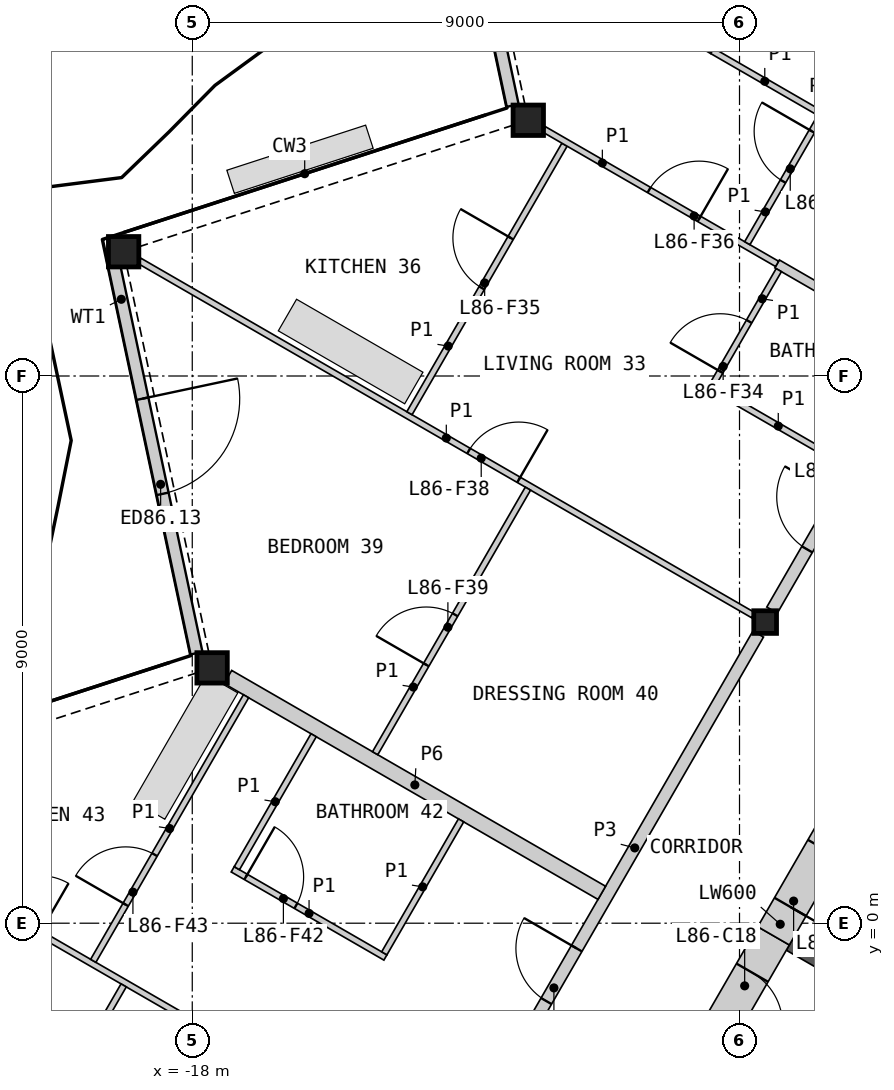
"""IFC4 building model, lengths in metres.
Left out: names, types, materials, properties, quantities, classifications, styles, units other than length and angle.
Written with IfcOpenShell. Run it as: python <this file> out.ifc"""

import sys

from ifc_helpers import new_model, si_unit, direction, frame, frame_2d, origin, origin_2d, place, context, subcontext, project, spatial, polyline, rectangle, hollow_rectangle, i_section, outline, extrude, element, fill, save


model = new_model("IFC4")
c1 = context("Model", 3, precision=1e-05, world=origin(), true_north=direction((0.0, 1.0)))
c2 = subcontext(c1, "Body", "Model", "MODEL_VIEW")
j1 = project(units=[si_unit("LENGTHUNIT", "METRE"), si_unit("PLANEANGLEUNIT", "RADIAN")], contexts=[c1])
p1 = place(None, origin())
s1 = spatial("IfcSite", under=j1, at=p1, CompositionType="ELEMENT")
p2 = place(p1, origin())
s2 = spatial("IfcBuilding", under=s1, at=p2, CompositionType="ELEMENT")
p3 = place(p2, frame((0.0, 0.0, 381.4)))
s3 = spatial("IfcBuildingStorey", under=s2, at=p3, CompositionType="ELEMENT", Elevation=381.4)
for number, where, z_axis, x_axis in (
    (1, (-12.474, 13.206, 0.0), (0.0, 0.0, 1.0), (1.0, 0.0, 0.0)),
    (2, (-19.129, 11.044, 0.0), (0.0, 0.0, 1.0), (1.0, 0.0, 0.0)),
    (3, (-17.674, 4.199, 0.0), (0.0, 0.0, 1.0), (1.0, 0.0, 0.0)),
):
    element("IfcColumn", number, at=place(p3, frame(where, z_axis=z_axis, x_axis=x_axis)), inside=s3, PredefinedType="COLUMN", context=c2, shape_type="SweptSolid", body=[
        extrude(hollow_rectangle(XDim=0.5, YDim=0.5, WallThickness=0.03, at=origin_2d()), origin(), (0.0, 0.0, 1.0), 3.4),
    ])
p4 = place(p3, frame((-8.578, 4.953, 0.0), z_axis=(0.0, 0.0, 1.0), x_axis=(1.0, 0.0, 0.0)))
e4 = element("IfcColumn", 4, at=p4, inside=s3, PredefinedType="COLUMN", context=c2, shape_type="SweptSolid", body=[
    extrude(i_section(OverallWidth=0.374, OverallDepth=0.372, WebThickness=0.016, FlangeThickness=0.026, at=origin_2d()), origin(), (0.0, 0.0, 1.0), 3.4),
])
p5 = place(p3, frame((-14.104, 19.915, 0.0), z_axis=(0.0, 0.0, 1.0), x_axis=(0.207924998532, -0.978144771997, 0.0)))
e5 = element("IfcWall", 5, at=p5, inside=s3, PredefinedType="SOLIDWALL", context=c2, shape_type="SweptSolid", body=[
    extrude(rectangle(XDim=6.612, YDim=0.2, at=frame_2d((3.306, 0.0))), origin(), (0.0, 0.0, 1.0), 2.634),
])
p6 = place(p5, frame((2.333, 0.0, 0.0)))
e6 = element("IfcOpeningElement", 6, at=p6, cuts=e5, PredefinedType="OPENING", context=c2, shape_type="SweptSolid", body=[
    extrude(rectangle(XDim=1.6, YDim=2.25, at=frame_2d((0.8, 1.125))), frame((0.0, 0.11, 0.0), z_axis=(0.0, -1.0, 0.0), x_axis=(1.0, 0.0, 0.0)), (0.0, 0.0, 1.0), 0.22),
])
p7 = place(p3, frame((-19.304, 10.909, 0.0), z_axis=(0.0, 0.0, 1.0), x_axis=(0.207882161022, -0.97815387702, 0.0)))
e7 = element("IfcWall", 7, at=p7, inside=s3, PredefinedType="SOLIDWALL", context=c2, shape_type="SweptSolid", body=[
    extrude(rectangle(XDim=6.612, YDim=0.2, at=frame_2d((3.306, 0.0))), origin(), (0.0, 0.0, 1.0), 2.634),
])
p8 = place(p7, frame((2.333, 0.0, 0.0)))
e8 = element("IfcOpeningElement", 8, at=p8, cuts=e7, PredefinedType="OPENING", context=c2, shape_type="SweptSolid", body=[
    extrude(rectangle(XDim=1.6, YDim=2.25, at=frame_2d((0.8, 1.125))), frame((0.0, 0.11, 0.0), z_axis=(0.0, -1.0, 0.0), x_axis=(1.0, 0.0, 0.0)), (0.0, 0.0, 1.0), 0.22),
])
p9 = place(p3, origin())
e9 = element("IfcWall", 9, at=p9, inside=s3, PredefinedType="SHEAR", context=c2, shape_type="SweptSolid", body=[
    extrude(outline(polyline([(-6.061, -1.697), (-8.231, -0.444), (-8.131, -0.271), (-5.96, -1.524), (-6.061, -1.697)])), origin(), (0.0, 0.0, 1.0), 3.1),
])
p10 = place(p3, origin())
e10 = element("IfcWall", 10, at=p10, inside=s3, PredefinedType="SHEAR", context=c2, shape_type="SweptSolid", body=[
    extrude(outline(polyline([(-5.307, -1.281), (-10.374, -4.206), (-10.032, -4.298), (-5.182, -1.498), (-5.307, -1.281)])), origin(), (0.0, 0.0, 1.0), 3.1),
])
p11 = place(p3, frame((-8.44, -0.208, 0.0), z_axis=(0.0, 0.0, 1.0), x_axis=(-0.500001951578, -0.866024277037, 0.0)))
e11 = element("IfcWall", 11, at=p11, inside=s3, PredefinedType="SHEAR", context=c2, shape_type="SweptSolid", body=[
    extrude(rectangle(XDim=2.243, YDim=0.6, at=frame_2d((1.122, 0.0))), origin(), (0.0, 0.0, 1.0), 3.1),
])
p12 = place(p11, frame((0.7, 0.0, 0.0)))
e12 = element("IfcOpeningElement", 12, at=p12, cuts=e11, PredefinedType="OPENING", context=c2, shape_type="SweptSolid", body=[
    extrude(rectangle(XDim=1.0, YDim=2.1, at=frame_2d((0.5, 1.05))), frame((0.0, 0.31, 0.0), z_axis=(0.0, -1.0, 0.0), x_axis=(1.0, 0.0, 0.0)), (0.0, 0.0, 1.0), 0.62),
])
p13 = place(p3, frame((-7.34, 1.698, 0.0), z_axis=(0.0, 0.0, 1.0), x_axis=(-0.50002983664, -0.866008176907, 0.0)))
e13 = element("IfcWall", 13, at=p13, inside=s3, PredefinedType="SHEAR", context=c2, shape_type="SweptSolid", body=[
    extrude(rectangle(XDim=2.2, YDim=0.6, at=frame_2d((1.1, 0.0))), origin(), (0.0, 0.0, 1.0), 3.1),
])
p14 = place(p13, frame((0.55, 0.0, 0.0)))
e14 = element("IfcOpeningElement", 14, at=p14, cuts=e13, PredefinedType="OPENING", context=c2, shape_type="SweptSolid", body=[
    extrude(rectangle(XDim=1.1, YDim=2.1, at=frame_2d((0.55, 1.05))), frame((0.0, 0.31, 0.0), z_axis=(0.0, -1.0, 0.0), x_axis=(1.0, 0.0, 0.0)), (0.0, 0.0, 1.0), 0.62),
])
p15 = place(p3, frame((-8.465, 5.15, 0.0), z_axis=(0.0, 0.0, 1.0), x_axis=(0.499992155518, 0.866029932751, 0.0)))
e15 = element("IfcWall", 15, at=p15, inside=s3, PredefinedType="PARTITIONING", context=c2, shape_type="SweptSolid", body=[
    extrude(rectangle(XDim=8.123, YDim=0.2, at=frame_2d((4.062, 0.0))), origin(), (0.0, 0.0, 1.0), 3.1),
])
p16 = place(p15, frame((1.153, 0.0, 0.0)))
e16 = element("IfcOpeningElement", 16, at=p16, cuts=e15, PredefinedType="OPENING", context=c2, shape_type="SweptSolid", body=[
    extrude(rectangle(XDim=1.0, YDim=2.1, at=frame_2d((0.5, 1.05))), frame((0.0, 0.11, 0.0), z_axis=(0.0, -1.0, 0.0), x_axis=(1.0, 0.0, 0.0)), (0.0, 0.0, 1.0), 0.22),
])
p17 = place(p3, frame((-12.754, -2.279, 0.0), z_axis=(0.0, 0.0, 1.0), x_axis=(0.500001682468, 0.866024432409, 0.0)))
e17 = element("IfcWall", 17, at=p17, inside=s3, PredefinedType="PARTITIONING", context=c2, shape_type="SweptSolid", body=[
    extrude(rectangle(XDim=8.124, YDim=0.2, at=frame_2d((4.062, 0.0))), origin(), (0.0, 0.0, 1.0), 3.1),
])
p18 = place(p17, frame((1.153, 0.0, 0.0)))
e18 = element("IfcOpeningElement", 18, at=p18, cuts=e17, PredefinedType="OPENING", context=c2, shape_type="SweptSolid", body=[
    extrude(rectangle(XDim=1.0, YDim=2.1, at=frame_2d((0.5, 1.05))), frame((0.0, 0.11, 0.0), z_axis=(0.0, -1.0, 0.0), x_axis=(1.0, 0.0, 0.0)), (0.0, 0.0, 1.0), 0.22),
])
p19 = place(p3, frame((-17.414, 4.049, 0.0), z_axis=(0.0, 0.0, 1.0), x_axis=(0.866033839264, -0.499985389037, 0.0)))
e19 = element("IfcWall", 19, at=p19, inside=s3, PredefinedType="PARTITIONING", context=c2, shape_type="SweptSolid", body=[
    extrude(rectangle(XDim=7.1, YDim=0.25, at=frame_2d((3.55, 0.0))), origin(), (0.0, 0.0, 1.0), 2.33),
])
p20 = place(p3, frame((-8.382, 10.844, 0.0), z_axis=(0.0, 0.0, 1.0), x_axis=(0.866021425885, -0.500006889861, 0.0)))
e20 = element("IfcWall", 20, at=p20, inside=s3, PredefinedType="PLUMBINGWALL", context=c2, shape_type="SweptSolid", body=[
    extrude(rectangle(XDim=2.675, YDim=0.15, at=frame_2d((1.337, 0.0))), origin(), (0.0, 0.0, 1.0), 2.33),
])
p21 = place(p3, frame((-24.069, 1.887, 0.0), z_axis=(0.0, 0.0, 1.0), x_axis=(0.866023404247, -0.500003463284, 0.0)))
e21 = element("IfcWall", 21, at=p21, inside=s3, PredefinedType="PARTITIONING", context=c2, shape_type="SweptSolid", body=[
    extrude(rectangle(XDim=11.782, YDim=0.1, at=frame_2d((5.891, 0.0))), origin(), (0.0, 0.0, 1.0), 2.33),
])
p22 = place(p21, frame((3.159, 0.0, 0.0)))
e22 = element("IfcOpeningElement", 22, at=p22, cuts=e21, PredefinedType="OPENING", context=c2, shape_type="SweptSolid", body=[
    extrude(rectangle(XDim=0.95, YDim=2.1, at=frame_2d((0.475, 1.05))), frame((0.0, 0.06, 0.0), z_axis=(0.0, -1.0, 0.0), x_axis=(1.0, 0.0, 0.0)), (0.0, 0.0, 1.0), 0.12),
])
p23 = place(p3, frame((-18.869, 10.894, 0.0), z_axis=(0.0, 0.0, 1.0), x_axis=(0.866023724155, -0.500002909193, 0.0)))
e23 = element("IfcWall", 23, at=p23, inside=s3, PredefinedType="PARTITIONING", context=c2, shape_type="SweptSolid", body=[
    extrude(rectangle(XDim=11.655, YDim=0.1, at=frame_2d((5.827, 0.0))), origin(), (0.0, 0.0, 1.0), 2.33),
])
p24 = place(p23, frame((6.253, 0.0, 0.0)))
e24 = element("IfcOpeningElement", 24, at=p24, cuts=e23, PredefinedType="OPENING", context=c2, shape_type="SweptSolid", body=[
    extrude(rectangle(XDim=0.95, YDim=2.1, at=frame_2d((0.475, 1.05))), frame((0.0, 0.06, 0.0), z_axis=(0.0, -1.0, 0.0), x_axis=(1.0, 0.0, 0.0)), (0.0, 0.0, 1.0), 0.12),
])
p25 = place(p3, frame((-22.298, -6.512, 0.0), z_axis=(0.0, 0.0, 1.0), x_axis=(0.499991387631, 0.866030376081, 0.0)))
e25 = element("IfcWall", 25, at=p25, inside=s3, PredefinedType="PARTITIONING", context=c2, shape_type="SweptSolid", body=[
    extrude(rectangle(XDim=6.339, YDim=0.1, at=frame_2d((3.169, 0.0))), origin(), (0.0, 0.0, 1.0), 2.33),
])
p26 = place(p25, frame((3.0, 0.0, 0.0)))
e26 = element("IfcOpeningElement", 26, at=p26, cuts=e25, PredefinedType="OPENING", context=c2, shape_type="SweptSolid", body=[
    extrude(rectangle(XDim=0.95, YDim=2.1, at=frame_2d((0.475, 1.05))), frame((0.0, 0.06, 0.0), z_axis=(0.0, -1.0, 0.0), x_axis=(1.0, 0.0, 0.0)), (0.0, 0.0, 1.0), 0.12),
])
p27 = place(p3, frame((-9.517, 14.328, 0.0), z_axis=(0.0, 0.0, 1.0), x_axis=(0.499996545922, 0.866027397988, 0.0)))
e27 = element("IfcWall", 27, at=p27, inside=s3, PredefinedType="PARTITIONING", context=c2, shape_type="SweptSolid", body=[
    extrude(rectangle(XDim=5.5, YDim=0.1, at=frame_2d((2.75, 0.0))), origin(), (0.0, 0.0, 1.0), 2.33),
])
p28 = place(p27, frame((4.3, 0.0, 0.0)))
e28 = element("IfcOpeningElement", 28, at=p28, cuts=e27, PredefinedType="OPENING", context=c2, shape_type="SweptSolid", body=[
    extrude(rectangle(XDim=0.95, YDim=2.1, at=frame_2d((0.475, 1.05))), frame((0.0, 0.06, 0.0), z_axis=(0.0, -1.0, 0.0), x_axis=(1.0, 0.0, 0.0)), (0.0, 0.0, 1.0), 0.12),
])
p29 = place(p27, frame((0.25, 0.0, 0.0)))
e29 = element("IfcOpeningElement", 29, at=p29, cuts=e27, PredefinedType="OPENING", context=c2, shape_type="SweptSolid", body=[
    extrude(rectangle(XDim=0.95, YDim=2.1, at=frame_2d((0.475, 1.05))), frame((0.0, 0.06, 0.0), z_axis=(0.0, -1.0, 0.0), x_axis=(1.0, 0.0, 0.0)), (0.0, 0.0, 1.0), 0.12),
])
p30 = place(p3, frame((-19.628, -0.619, 0.0), z_axis=(0.0, 0.0, 1.0), x_axis=(0.499990214365, 0.86603105345, 0.0)))
e30 = element("IfcWall", 30, at=p30, inside=s3, PredefinedType="PARTITIONING", context=c2, shape_type="SweptSolid", body=[
    extrude(rectangle(XDim=5.025, YDim=0.1, at=frame_2d((2.512, 0.0))), origin(), (0.0, 0.0, 1.0), 2.33),
])
p31 = place(p30, frame((1.067, 0.0, 0.0)))
e31 = element("IfcOpeningElement", 31, at=p31, cuts=e30, PredefinedType="OPENING", context=c2, shape_type="SweptSolid", body=[
    extrude(rectangle(XDim=0.95, YDim=2.1, at=frame_2d((0.475, 1.05))), frame((0.0, 0.06, 0.0), z_axis=(0.0, -1.0, 0.0), x_axis=(1.0, 0.0, 0.0)), (0.0, 0.0, 1.0), 0.12),
])
p32 = place(p3, frame((-14.992, 2.796, 0.0), z_axis=(0.0, 0.0, 1.0), x_axis=(0.499990214365, 0.86603105345, 0.0)))
e32 = element("IfcWall", 32, at=p32, inside=s3, PredefinedType="PARTITIONING", context=c2, shape_type="SweptSolid", body=[
    extrude(rectangle(XDim=5.025, YDim=0.1, at=frame_2d((2.512, 0.0))), origin(), (0.0, 0.0, 1.0), 2.33),
])
p33 = place(p32, frame((1.68, 0.0, 0.0)))
e33 = element("IfcOpeningElement", 33, at=p33, cuts=e32, PredefinedType="OPENING", context=c2, shape_type="SweptSolid", body=[
    extrude(rectangle(XDim=0.95, YDim=2.1, at=frame_2d((0.475, 1.05))), frame((0.0, 0.06, 0.0), z_axis=(0.0, -1.0, 0.0), x_axis=(1.0, 0.0, 0.0)), (0.0, 0.0, 1.0), 0.12),
])
p34 = place(p3, frame((-14.428, 8.388, 0.0), z_axis=(0.0, 0.0, 1.0), x_axis=(0.500005610874, 0.86602216432, 0.0)))
e34 = element("IfcWall", 34, at=p34, inside=s3, PredefinedType="PARTITIONING", context=c2, shape_type="SweptSolid", body=[
    extrude(rectangle(XDim=5.1, YDim=0.1, at=frame_2d((2.55, 0.0))), origin(), (0.0, 0.0, 1.0), 2.33),
])
p35 = place(p34, frame((2.379, 0.0, 0.0)))
e35 = element("IfcOpeningElement", 35, at=p35, cuts=e34, PredefinedType="OPENING", context=c2, shape_type="SweptSolid", body=[
    extrude(rectangle(XDim=0.95, YDim=2.1, at=frame_2d((0.475, 1.05))), frame((0.0, 0.06, 0.0), z_axis=(0.0, -1.0, 0.0), x_axis=(1.0, 0.0, 0.0)), (0.0, 0.0, 1.0), 0.12),
])
p36 = place(p3, frame((-12.214, 13.056, 0.0), z_axis=(0.0, 0.0, 1.0), x_axis=(0.866017452598, -0.500013771606, 0.0)))
e36 = element("IfcWall", 36, at=p36, inside=s3, PredefinedType="PARTITIONING", context=c2, shape_type="SweptSolid", body=[
    extrude(rectangle(XDim=4.425, YDim=0.1, at=frame_2d((2.213, 0.0))), origin(), (0.0, 0.0, 1.0), 2.33),
])
p37 = place(p36, frame((1.994, 0.0, 0.0)))
e37 = element("IfcOpeningElement", 37, at=p37, cuts=e36, PredefinedType="OPENING", context=c2, shape_type="SweptSolid", body=[
    extrude(rectangle(XDim=0.95, YDim=2.1, at=frame_2d((0.475, 1.05))), frame((0.0, 0.06, 0.0), z_axis=(0.0, -1.0, 0.0), x_axis=(1.0, 0.0, 0.0)), (0.0, 0.0, 1.0), 0.12),
])
p38 = place(p3, frame((-17.335, 0.886, 0.0), z_axis=(0.0, 0.0, 1.0), x_axis=(0.866032775405, -0.499987231761, 0.0)))
e38 = element("IfcWall", 38, at=p38, inside=s3, PredefinedType="PARTITIONING", context=c2, shape_type="SweptSolid", body=[
    extrude(rectangle(XDim=2.9, YDim=0.1, at=frame_2d((1.45, 0.0))), origin(), (0.0, 0.0, 1.0), 2.33),
])
p39 = place(p38, frame((0.25, 0.0, 0.0)))
e39 = element("IfcOpeningElement", 39, at=p39, cuts=e38, PredefinedType="OPENING", context=c2, shape_type="SweptSolid", body=[
    extrude(rectangle(XDim=0.95, YDim=2.1, at=frame_2d((0.475, 1.05))), frame((0.0, 0.06, 0.0), z_axis=(0.0, -1.0, 0.0), x_axis=(1.0, 0.0, 0.0)), (0.0, 0.0, 1.0), 0.12),
])
p40 = place(p3, frame((-9.51, 8.839, 0.0), z_axis=(0.0, 0.0, 1.0), x_axis=(0.866029095148, -0.499993606316, 0.0)))
e40 = element("IfcWall", 40, at=p40, inside=s3, PredefinedType="PARTITIONING", context=c2, shape_type="SweptSolid", body=[
    extrude(rectangle(XDim=2.65, YDim=0.1, at=frame_2d((1.325, 0.0))), origin(), (0.0, 0.0, 1.0), 2.33),
])
p41 = place(p3, frame((-17.267, 0.905, 0.0), z_axis=(0.0, 0.0, 1.0), x_axis=(0.499976333282, 0.866039067339, 0.0)))
e41 = element("IfcWall", 41, at=p41, inside=s3, PredefinedType="PARTITIONING", context=c2, shape_type="SweptSolid", body=[
    extrude(rectangle(XDim=2.525, YDim=0.1, at=frame_2d((1.262, 0.0))), origin(), (0.0, 0.0, 1.0), 2.33),
])
p42 = place(p3, frame((-14.842, -0.496, 0.0), z_axis=(0.0, 0.0, 1.0), x_axis=(0.500048846702, 0.865997200291, 0.0)))
e42 = element("IfcWall", 42, at=p42, inside=s3, PredefinedType="PARTITIONING", context=c2, shape_type="SweptSolid", body=[
    extrude(rectangle(XDim=2.525, YDim=0.1, at=frame_2d((1.263, 0.0))), origin(), (0.0, 0.0, 1.0), 2.33),
])
p43 = place(p3, frame((-8.872, 11.184, 0.0), z_axis=(0.0, 0.0, 1.0), x_axis=(0.499986429846, 0.866033238375, 0.0)))
e43 = element("IfcWall", 43, at=p43, inside=s3, PredefinedType="PARTITIONING", context=c2, shape_type="SweptSolid", body=[
    extrude(rectangle(XDim=2.375, YDim=0.1, at=frame_2d((1.188, 0.0))), origin(), (0.0, 0.0, 1.0), 2.33),
])
p44 = place(p43, frame((1.175, 0.0, 0.0)))
e44 = element("IfcOpeningElement", 44, at=p44, cuts=e43, PredefinedType="OPENING", context=c2, shape_type="SweptSolid", body=[
    extrude(rectangle(XDim=0.95, YDim=2.1, at=frame_2d((0.475, 1.05))), frame((0.0, 0.06, 0.0), z_axis=(0.0, -1.0, 0.0), x_axis=(1.0, 0.0, 0.0)), (0.0, 0.0, 1.0), 0.12),
])
p45 = place(p3, frame((-9.442, 8.858, 0.0), z_axis=(0.0, 0.0, 1.0), x_axis=(0.499978335414, 0.866037911478, 0.0)))
e45 = element("IfcWall", 45, at=p45, inside=s3, PredefinedType="PARTITIONING", context=c2, shape_type="SweptSolid", body=[
    extrude(rectangle(XDim=2.175, YDim=0.1, at=frame_2d((1.087, 0.0))), origin(), (0.0, 0.0, 1.0), 2.33),
])
p46 = place(p45, frame((0.25, 0.0, 0.0)))
e46 = element("IfcOpeningElement", 46, at=p46, cuts=e45, PredefinedType="OPENING", context=c2, shape_type="SweptSolid", body=[
    extrude(rectangle(XDim=0.95, YDim=2.1, at=frame_2d((0.475, 1.05))), frame((0.0, 0.06, 0.0), z_axis=(0.0, -1.0, 0.0), x_axis=(1.0, 0.0, 0.0)), (0.0, 0.0, 1.0), 0.12),
])
p47 = place(p3, frame((-9.448, 14.346, 0.0), z_axis=(0.0, 0.0, 1.0), x_axis=(0.866020521143, -0.500008456887, 0.0)))
e47 = element("IfcWall", 47, at=p47, inside=s3, PredefinedType="PARTITIONING", context=c2, shape_type="SweptSolid", body=[
    extrude(rectangle(XDim=1.995, YDim=0.1, at=frame_2d((0.998, 0.0))), origin(), (0.0, 0.0, 1.0), 2.33),
])
p48 = place(p8, origin())
e48 = element("IfcDoor", 48, at=p48, inside=s3, OperationType="DOUBLE_DOOR_SINGLE_SWING", PredefinedType="DOOR", context=c2, shape_type="SweptSolid", body=[
    extrude(rectangle(XDim=1.6, YDim=2.25, at=frame_2d((0.8, 1.125))), frame((0.0, 0.025, 0.0), z_axis=(0.0, -1.0, 0.0), x_axis=(1.0, 0.0, 0.0)), (0.0, 0.0, 1.0), 0.05),
])
fill(e8, e48)
p49 = place(p12, origin())
e49 = element("IfcDoor", 49, at=p49, inside=s3, OperationType="SINGLE_SWING_RIGHT", PredefinedType="DOOR", context=c2, shape_type="SweptSolid", body=[
    extrude(rectangle(XDim=1.0, YDim=2.1, at=frame_2d((0.5, 1.05))), frame((0.0, 0.055, 0.0), z_axis=(0.0, -1.0, 0.0), x_axis=(1.0, 0.0, 0.0)), (0.0, 0.0, 1.0), 0.05),
])
fill(e12, e49)
p50 = place(p14, origin())
e50 = element("IfcDoor", 50, at=p50, inside=s3, OperationType="SINGLE_SWING_RIGHT", PredefinedType="DOOR", context=c2, shape_type="SweptSolid", body=[
    extrude(rectangle(XDim=1.1, YDim=2.1, at=frame_2d((0.55, 1.05))), frame((0.0, 0.055, 0.0), z_axis=(0.0, -1.0, 0.0), x_axis=(1.0, 0.0, 0.0)), (0.0, 0.0, 1.0), 0.05),
])
fill(e14, e50)
p51 = place(p16, origin())
e51 = element("IfcDoor", 51, at=p51, inside=s3, OperationType="SINGLE_SWING_RIGHT", PredefinedType="DOOR", context=c2, shape_type="SweptSolid", body=[
    extrude(rectangle(XDim=1.0, YDim=2.1, at=frame_2d((0.5, 1.05))), frame((0.0, 0.025, 0.0), z_axis=(0.0, -1.0, 0.0), x_axis=(1.0, 0.0, 0.0)), (0.0, 0.0, 1.0), 0.05),
])
fill(e16, e51)
p52 = place(p46, origin())
e52 = element("IfcDoor", 52, at=p52, inside=s3, OperationType="SINGLE_SWING_LEFT", PredefinedType="DOOR", context=c2, shape_type="SweptSolid", body=[
    extrude(rectangle(XDim=0.95, YDim=2.1, at=frame_2d((0.475, 1.05))), frame((0.0, 0.025, 0.0), z_axis=(0.0, -1.0, 0.0), x_axis=(1.0, 0.0, 0.0)), (0.0, 0.0, 1.0), 0.05),
])
fill(e46, e52)
p53 = place(p35, origin())
e53 = element("IfcDoor", 53, at=p53, inside=s3, OperationType="SINGLE_SWING_RIGHT", PredefinedType="DOOR", context=c2, shape_type="SweptSolid", body=[
    extrude(rectangle(XDim=0.95, YDim=2.1, at=frame_2d((0.475, 1.05))), frame((0.0, 0.025, 0.0), z_axis=(0.0, -1.0, 0.0), x_axis=(1.0, 0.0, 0.0)), (0.0, 0.0, 1.0), 0.05),
])
fill(e35, e53)
p54 = place(p37, origin())
e54 = element("IfcDoor", 54, at=p54, inside=s3, OperationType="SINGLE_SWING_RIGHT", PredefinedType="DOOR", context=c2, shape_type="SweptSolid", body=[
    extrude(rectangle(XDim=0.95, YDim=2.1, at=frame_2d((0.475, 1.05))), frame((0.0, 0.025, 0.0), z_axis=(0.0, -1.0, 0.0), x_axis=(1.0, 0.0, 0.0)), (0.0, 0.0, 1.0), 0.05),
])
fill(e37, e54)
p55 = place(p44, origin())
e55 = element("IfcDoor", 55, at=p55, inside=s3, OperationType="SINGLE_SWING_RIGHT", PredefinedType="DOOR", context=c2, shape_type="SweptSolid", body=[
    extrude(rectangle(XDim=0.95, YDim=2.1, at=frame_2d((0.475, 1.05))), frame((0.0, 0.025, 0.0), z_axis=(0.0, -1.0, 0.0), x_axis=(1.0, 0.0, 0.0)), (0.0, 0.0, 1.0), 0.05),
])
fill(e44, e55)
p56 = place(p24, origin())
e56 = element("IfcDoor", 56, at=p56, inside=s3, OperationType="SINGLE_SWING_RIGHT", PredefinedType="DOOR", context=c2, shape_type="SweptSolid", body=[
    extrude(rectangle(XDim=0.95, YDim=2.1, at=frame_2d((0.475, 1.05))), frame((0.0, 0.025, 0.0), z_axis=(0.0, -1.0, 0.0), x_axis=(1.0, 0.0, 0.0)), (0.0, 0.0, 1.0), 0.05),
])
fill(e24, e56)
p57 = place(p33, origin())
e57 = element("IfcDoor", 57, at=p57, inside=s3, OperationType="SINGLE_SWING_LEFT", PredefinedType="DOOR", context=c2, shape_type="SweptSolid", body=[
    extrude(rectangle(XDim=0.95, YDim=2.1, at=frame_2d((0.475, 1.05))), frame((0.0, 0.025, 0.0), z_axis=(0.0, -1.0, 0.0), x_axis=(1.0, 0.0, 0.0)), (0.0, 0.0, 1.0), 0.05),
])
fill(e33, e57)
p58 = place(p18, origin())
e58 = element("IfcDoor", 58, at=p58, inside=s3, OperationType="SINGLE_SWING_RIGHT", PredefinedType="DOOR", context=c2, shape_type="SweptSolid", body=[
    extrude(rectangle(XDim=1.0, YDim=2.1, at=frame_2d((0.5, 1.05))), frame((0.0, 0.025, 0.0), z_axis=(0.0, -1.0, 0.0), x_axis=(1.0, 0.0, 0.0)), (0.0, 0.0, 1.0), 0.05),
])
fill(e18, e58)
p59 = place(p39, origin())
e59 = element("IfcDoor", 59, at=p59, inside=s3, OperationType="SINGLE_SWING_LEFT", PredefinedType="DOOR", context=c2, shape_type="SweptSolid", body=[
    extrude(rectangle(XDim=0.95, YDim=2.1, at=frame_2d((0.475, 1.05))), frame((0.0, 0.025, 0.0), z_axis=(0.0, -1.0, 0.0), x_axis=(1.0, 0.0, 0.0)), (0.0, 0.0, 1.0), 0.05),
])
fill(e39, e59)
p60 = place(p31, origin())
e60 = element("IfcDoor", 60, at=p60, inside=s3, OperationType="SINGLE_SWING_LEFT", PredefinedType="DOOR", context=c2, shape_type="SweptSolid", body=[
    extrude(rectangle(XDim=0.95, YDim=2.1, at=frame_2d((0.475, 1.05))), frame((0.0, 0.025, 0.0), z_axis=(0.0, -1.0, 0.0), x_axis=(1.0, 0.0, 0.0)), (0.0, 0.0, 1.0), 0.05),
])
fill(e31, e60)
save(model, sys.argv[1])
